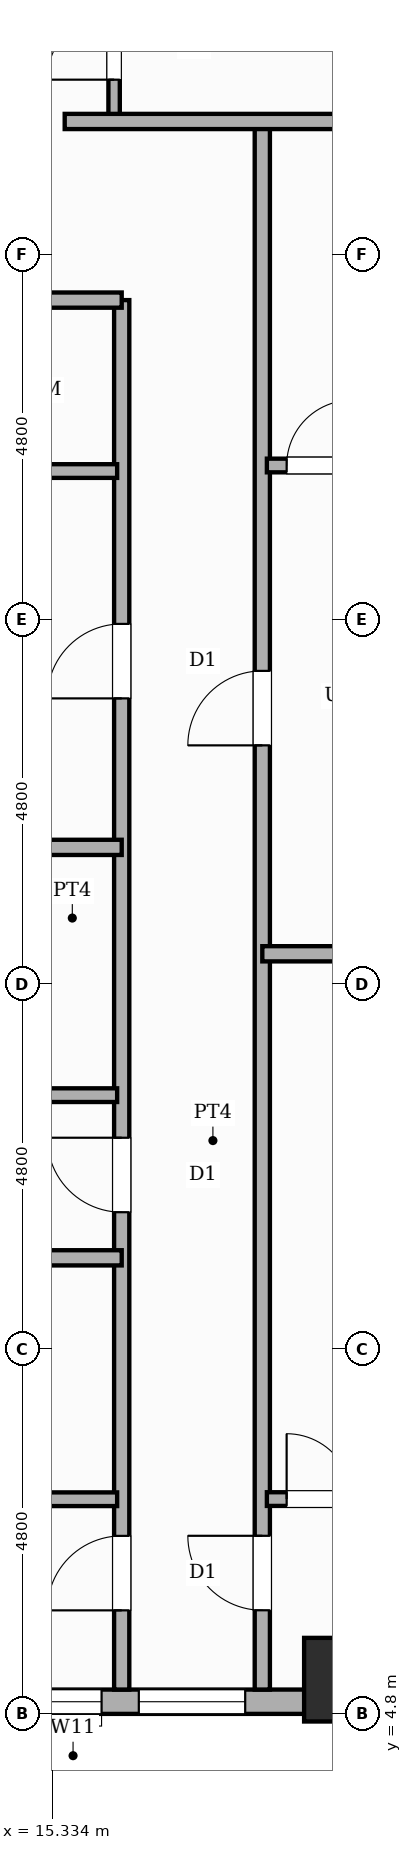
"""IFC4 building model, lengths in metres.
Left out: names, types, materials, properties, quantities, classifications, styles, units other than length and angle.
Written with IfcOpenShell. Run it as: python <this file> out.ifc"""

import sys

from ifc_helpers import new_model, si_unit, direction, frame, frame_2d, origin, origin_2d, place, context, subcontext, project, spatial, rectangle, extrude, element, fill, save


model = new_model("IFC4")
c1 = context("Model", 3, precision=1e-05, world=origin(), true_north=direction((0.0, 1.0)))
c2 = subcontext(c1, "Body", "Model", "MODEL_VIEW")
j1 = project(units=[si_unit("LENGTHUNIT", "METRE"), si_unit("PLANEANGLEUNIT", "RADIAN")], contexts=[c1])
p1 = place(None, origin())
s1 = spatial("IfcSite", under=j1, at=p1, CompositionType="ELEMENT")
p2 = place(p1, origin())
s2 = spatial("IfcBuilding", under=s1, at=p2, CompositionType="ELEMENT")
p3 = place(p2, frame((0.0, 0.0, 46.6)))
s3 = spatial("IfcBuildingStorey", under=s2, at=p3, CompositionType="ELEMENT", Elevation=46.6)
p4 = place(p3, frame((19.2, 5.25, 0.0), z_axis=(0.0, 0.0, 1.0), x_axis=(1.0, 0.0, 0.0)))
e1 = element("IfcColumn", 1, at=p4, inside=s3, PredefinedType="COLUMN", context=c2, shape_type="SweptSolid", body=[
    extrude(rectangle(XDim=1.1, YDim=1.1, at=origin_2d()), origin(), (0.0, 0.0, 1.0), 3.6),
])
p5 = place(p3, frame((21.6, 4.96, 0.0), z_axis=(0.0, 0.0, 1.0), x_axis=(-1.0, 0.0, 0.0)))
e2 = element("IfcWall", 2, at=p5, inside=s3, PredefinedType="STANDARD", context=c2, shape_type="SweptSolid", body=[
    extrude(rectangle(XDim=14.4, YDim=0.32, at=frame_2d((7.2, 0.0))), origin(), (0.0, 0.0, 1.0), 2.53),
])
p6 = place(p5, frame((5.615, 0.0, 0.45)))
e3 = element("IfcOpeningElement", 3, at=p6, cuts=e2, PredefinedType="OPENING", context=c2, shape_type="SweptSolid", body=[
    extrude(rectangle(XDim=0.75, YDim=1.8, at=frame_2d((0.375, 0.9))), frame((0.0, 0.17, 0.0), z_axis=(0.0, -1.0, 0.0), x_axis=(1.0, 0.0, 0.0)), (0.0, 0.0, 1.0), 0.34),
])
p7 = place(p5, frame((3.725, 0.0, 0.65)))
e4 = element("IfcOpeningElement", 4, at=p7, cuts=e2, PredefinedType="OPENING", context=c2, shape_type="SweptSolid", body=[
    extrude(rectangle(XDim=1.4, YDim=1.1, at=frame_2d((0.7, 0.55))), frame((0.0, 0.17, 0.0), z_axis=(0.0, -1.0, 0.0), x_axis=(1.0, 0.0, 0.0)), (0.0, 0.0, 1.0), 0.34),
])
p8 = place(p5, frame((0.47, 0.0, 0.45)))
e5 = element("IfcOpeningElement", 5, at=p8, cuts=e2, PredefinedType="OPENING", context=c2, shape_type="SweptSolid", body=[
    extrude(rectangle(XDim=0.95, YDim=1.8, at=frame_2d((0.475, 0.9))), frame((0.0, 0.17, 0.0), z_axis=(0.0, -1.0, 0.0), x_axis=(1.0, 0.0, 0.0)), (0.0, 0.0, 1.0), 0.34),
])
p9 = place(p3, frame((16.15, 25.75, 0.0), z_axis=(0.0, 0.0, 1.0), x_axis=(0.0, 1.0, 0.0)))
e6 = element("IfcWall", 6, at=p9, inside=s3, PredefinedType="PARTITIONING", context=c2, shape_type="SweptSolid", body=[
    extrude(rectangle(XDim=2.25, YDim=0.15, at=frame_2d((1.125, 0.0))), origin(), (0.0, 0.0, 1.0), 3.35),
])
p10 = place(p9, frame((0.55, 0.0, 0.0)))
e7 = element("IfcOpeningElement", 7, at=p10, cuts=e6, PredefinedType="OPENING", context=c2, shape_type="SweptSolid", body=[
    extrude(rectangle(XDim=0.88, YDim=2.1, at=frame_2d((0.44, 1.05))), frame((0.0, 0.085, 0.0), z_axis=(0.0, -1.0, 0.0), x_axis=(1.0, 0.0, 0.0)), (0.0, 0.0, 1.0), 0.17),
])
p11 = place(p3, frame((16.25, 5.12, 0.0), z_axis=(0.0, 0.0, 1.0), x_axis=(0.0, 1.0, 0.0)))
e8 = element("IfcWall", 8, at=p11, inside=s3, PredefinedType="PARTITIONING", context=c2, shape_type="SweptSolid", body=[
    extrude(rectangle(XDim=18.28, YDim=0.2, at=frame_2d((9.14, 0.0))), origin(), (0.0, 0.0, 1.0), 3.35),
])
p12 = place(p11, frame((1.042, 0.0, 0.0)))
e9 = element("IfcOpeningElement", 9, at=p12, cuts=e8, PredefinedType="OPENING", context=c2, shape_type="SweptSolid", body=[
    extrude(rectangle(XDim=0.98, YDim=2.18, at=frame_2d((0.49, 1.09))), frame((0.0, 0.11, 0.0), z_axis=(0.0, -1.0, 0.0), x_axis=(1.0, 0.0, 0.0)), (0.0, 0.0, 1.0), 0.22),
])
p13 = place(p11, frame((6.28, 0.0, 0.0)))
e10 = element("IfcOpeningElement", 10, at=p13, cuts=e8, PredefinedType="OPENING", context=c2, shape_type="SweptSolid", body=[
    extrude(rectangle(XDim=0.98, YDim=2.18, at=frame_2d((0.49, 1.09))), frame((0.0, 0.11, 0.0), z_axis=(0.0, -1.0, 0.0), x_axis=(1.0, 0.0, 0.0)), (0.0, 0.0, 1.0), 0.22),
])
p14 = place(p11, frame((13.04, 0.0, 0.0)))
e11 = element("IfcOpeningElement", 11, at=p14, cuts=e8, PredefinedType="OPENING", context=c2, shape_type="SweptSolid", body=[
    extrude(rectangle(XDim=0.98, YDim=2.18, at=frame_2d((0.49, 1.09))), frame((0.0, 0.11, 0.0), z_axis=(0.0, -1.0, 0.0), x_axis=(1.0, 0.0, 0.0)), (0.0, 0.0, 1.0), 0.22),
])
p15 = place(p3, frame((18.1, 5.12, 0.0), z_axis=(0.0, 0.0, 1.0), x_axis=(0.0, 1.0, 0.0)))
e12 = element("IfcWall", 12, at=p15, inside=s3, PredefinedType="PARTITIONING", context=c2, shape_type="SweptSolid", body=[
    extrude(rectangle(XDim=20.63, YDim=0.2, at=frame_2d((10.315, 0.0))), origin(), (0.0, 0.0, 1.0), 3.35),
])
p16 = place(p15, frame((1.043, 0.0, 0.0)))
e13 = element("IfcOpeningElement", 13, at=p16, cuts=e12, PredefinedType="OPENING", context=c2, shape_type="SweptSolid", body=[
    extrude(rectangle(XDim=0.98, YDim=2.18, at=frame_2d((0.49, 1.09))), frame((0.0, 0.11, 0.0), z_axis=(0.0, -1.0, 0.0), x_axis=(1.0, 0.0, 0.0)), (0.0, 0.0, 1.0), 0.22),
])
p17 = place(p15, frame((12.422, 0.0, 0.0)))
e14 = element("IfcOpeningElement", 14, at=p17, cuts=e12, PredefinedType="OPENING", context=c2, shape_type="SweptSolid", body=[
    extrude(rectangle(XDim=0.98, YDim=2.18, at=frame_2d((0.49, 1.09))), frame((0.0, 0.11, 0.0), z_axis=(0.0, -1.0, 0.0), x_axis=(1.0, 0.0, 0.0)), (0.0, 0.0, 1.0), 0.22),
])
p18 = place(p3, frame((5.12, 23.4, 0.0), z_axis=(0.0, 0.0, 1.0), x_axis=(1.0, 0.0, 0.0)))
e15 = element("IfcWall", 15, at=p18, inside=s3, PredefinedType="PARTITIONING", context=c2, shape_type="SweptSolid", body=[
    extrude(rectangle(XDim=11.13, YDim=0.2, at=frame_2d((5.565, 0.0))), origin(), (0.0, 0.0, 1.0), 3.35),
])
p19 = place(p3, frame((15.5, 25.75, 0.0), z_axis=(0.0, 0.0, 1.0), x_axis=(1.0, 0.0, 0.0)))
e16 = element("IfcWall", 16, at=p19, inside=s3, PredefinedType="PARTITIONING", context=c2, shape_type="SweptSolid", body=[
    extrude(rectangle(XDim=8.18, YDim=0.2, at=frame_2d((4.09, 0.0))), origin(), (0.0, 0.0, 1.0), 3.35),
])
p20 = place(p3, frame((5.12, 7.624, 0.0), z_axis=(0.0, 0.0, 1.0), x_axis=(1.0, 0.0, 0.0)))
e17 = element("IfcWall", 17, at=p20, inside=s3, PredefinedType="PLUMBINGWALL", context=c2, shape_type="SweptSolid", body=[
    extrude(rectangle(XDim=11.07, YDim=0.18, at=frame_2d((5.535, 0.0))), origin(), (0.0, 0.0, 1.0), 3.35),
])
p21 = place(p20, frame((2.209, 0.0, 0.0)))
e18 = element("IfcOpeningElement", 18, at=p21, cuts=e17, PredefinedType="OPENING", context=c2, shape_type="SweptSolid", body=[
    extrude(rectangle(XDim=0.86, YDim=2.1, at=frame_2d((0.43, 1.05))), frame((0.0, 0.1, 0.0), z_axis=(0.0, -1.0, 0.0), x_axis=(1.0, 0.0, 0.0)), (0.0, 0.0, 1.0), 0.2),
])
p22 = place(p20, frame((7.824, 0.0, 0.0)))
e19 = element("IfcOpeningElement", 19, at=p22, cuts=e17, PredefinedType="OPENING", context=c2, shape_type="SweptSolid", body=[
    extrude(rectangle(XDim=0.86, YDim=2.1, at=frame_2d((0.43, 1.05))), frame((0.0, 0.1, 0.0), z_axis=(0.0, -1.0, 0.0), x_axis=(1.0, 0.0, 0.0)), (0.0, 0.0, 1.0), 0.2),
])
p23 = place(p3, frame((5.12, 10.8, 0.0), z_axis=(0.0, 0.0, 1.0), x_axis=(1.0, 0.0, 0.0)))
e20 = element("IfcWall", 20, at=p23, inside=s3, PredefinedType="SOLIDWALL", context=c2, shape_type="SweptSolid", body=[
    extrude(rectangle(XDim=11.13, YDim=0.2, at=frame_2d((5.565, 0.0))), origin(), (0.0, 0.0, 1.0), 3.35),
])
p24 = place(p3, frame((5.12, 12.94, 0.0), z_axis=(0.0, 0.0, 1.0), x_axis=(1.0, 0.0, 0.0)))
e21 = element("IfcWall", 21, at=p24, inside=s3, PredefinedType="PLUMBINGWALL", context=c2, shape_type="SweptSolid", body=[
    extrude(rectangle(XDim=11.07, YDim=0.18, at=frame_2d((5.535, 0.0))), origin(), (0.0, 0.0, 1.0), 3.35),
])
p25 = place(p24, frame((2.209, 0.0, 0.0)))
e22 = element("IfcOpeningElement", 22, at=p25, cuts=e21, PredefinedType="OPENING", context=c2, shape_type="SweptSolid", body=[
    extrude(rectangle(XDim=0.86, YDim=2.1, at=frame_2d((0.43, 1.05))), frame((0.0, 0.1, 0.0), z_axis=(0.0, -1.0, 0.0), x_axis=(1.0, 0.0, 0.0)), (0.0, 0.0, 1.0), 0.2),
])
p26 = place(p24, frame((7.824, 0.0, 0.0)))
e23 = element("IfcOpeningElement", 23, at=p26, cuts=e21, PredefinedType="OPENING", context=c2, shape_type="SweptSolid", body=[
    extrude(rectangle(XDim=0.86, YDim=2.1, at=frame_2d((0.43, 1.05))), frame((0.0, 0.1, 0.0), z_axis=(0.0, -1.0, 0.0), x_axis=(1.0, 0.0, 0.0)), (0.0, 0.0, 1.0), 0.2),
])
p27 = place(p3, frame((5.12, 16.2, 0.0), z_axis=(0.0, 0.0, 1.0), x_axis=(1.0, 0.0, 0.0)))
e24 = element("IfcWall", 24, at=p27, inside=s3, PredefinedType="SOLIDWALL", context=c2, shape_type="SweptSolid", body=[
    extrude(rectangle(XDim=11.13, YDim=0.2, at=frame_2d((5.565, 0.0))), origin(), (0.0, 0.0, 1.0), 3.35),
])
p28 = place(p3, frame((5.12, 21.151, 0.0), z_axis=(0.0, 0.0, 1.0), x_axis=(1.0, 0.0, 0.0)))
e25 = element("IfcWall", 25, at=p28, inside=s3, PredefinedType="PLUMBINGWALL", context=c2, shape_type="SweptSolid", body=[
    extrude(rectangle(XDim=11.07, YDim=0.18, at=frame_2d((5.535, 0.0))), origin(), (0.0, 0.0, 1.0), 3.35),
])
p29 = place(p28, frame((2.431, 0.0, 0.0)))
e26 = element("IfcOpeningElement", 26, at=p29, cuts=e25, PredefinedType="OPENING", context=c2, shape_type="SweptSolid", body=[
    extrude(rectangle(XDim=0.9, YDim=2.15, at=frame_2d((0.45, 1.075))), frame((0.0, 0.1, 0.0), z_axis=(0.0, -1.0, 0.0), x_axis=(1.0, 0.0, 0.0)), (0.0, 0.0, 1.0), 0.2),
])
p30 = place(p28, frame((8.046, 0.0, 0.0)))
e27 = element("IfcOpeningElement", 27, at=p30, cuts=e25, PredefinedType="OPENING", context=c2, shape_type="SweptSolid", body=[
    extrude(rectangle(XDim=0.86, YDim=2.1, at=frame_2d((0.43, 1.05))), frame((0.0, 0.1, 0.0), z_axis=(0.0, -1.0, 0.0), x_axis=(1.0, 0.0, 0.0)), (0.0, 0.0, 1.0), 0.2),
])
p31 = place(p3, frame((18.16, 7.626, 0.0), z_axis=(0.0, 0.0, 1.0), x_axis=(1.0, 0.0, 0.0)))
e28 = element("IfcWall", 28, at=p31, inside=s3, PredefinedType="PLUMBINGWALL", context=c2, shape_type="SweptSolid", body=[
    extrude(rectangle(XDim=5.52, YDim=0.18, at=frame_2d((2.76, 0.0))), origin(), (0.0, 0.0, 1.0), 3.35),
])
p32 = place(p31, frame((0.26, 0.0, 0.0)))
e29 = element("IfcOpeningElement", 29, at=p32, cuts=e28, PredefinedType="OPENING", context=c2, shape_type="SweptSolid", body=[
    extrude(rectangle(XDim=0.86, YDim=2.1, at=frame_2d((0.43, 1.05))), frame((0.0, 0.1, 0.0), z_axis=(0.0, -1.0, 0.0), x_axis=(1.0, 0.0, 0.0)), (0.0, 0.0, 1.0), 0.2),
])
p33 = place(p31, frame((1.698, 0.0, 0.0)))
e30 = element("IfcOpeningElement", 30, at=p33, cuts=e28, PredefinedType="OPENING", context=c2, shape_type="SweptSolid", body=[
    extrude(rectangle(XDim=0.9, YDim=2.15, at=frame_2d((0.45, 1.075))), frame((0.0, 0.1, 0.0), z_axis=(0.0, -1.0, 0.0), x_axis=(1.0, 0.0, 0.0)), (0.0, 0.0, 1.0), 0.2),
])
p34 = place(p31, frame((3.757, 0.0, 0.0)))
e31 = element("IfcOpeningElement", 31, at=p34, cuts=e28, PredefinedType="OPENING", context=c2, shape_type="SweptSolid", body=[
    extrude(rectangle(XDim=0.9, YDim=2.15, at=frame_2d((0.45, 1.075))), frame((0.0, 0.1, 0.0), z_axis=(0.0, -1.0, 0.0), x_axis=(1.0, 0.0, 0.0)), (0.0, 0.0, 1.0), 0.2),
])
p35 = place(p3, frame((18.1, 14.8, 0.0), z_axis=(0.0, 0.0, 1.0), x_axis=(1.0, 0.0, 0.0)))
e32 = element("IfcWall", 32, at=p35, inside=s3, PredefinedType="SOLIDWALL", context=c2, shape_type="SweptSolid", body=[
    extrude(rectangle(XDim=5.58, YDim=0.2, at=frame_2d((2.79, 0.0))), origin(), (0.0, 0.0, 1.0), 3.35),
])
p36 = place(p3, frame((18.16, 21.224, 0.0), z_axis=(0.0, 0.0, 1.0), x_axis=(1.0, 0.0, 0.0)))
e33 = element("IfcWall", 33, at=p36, inside=s3, PredefinedType="PLUMBINGWALL", context=c2, shape_type="SweptSolid", body=[
    extrude(rectangle(XDim=5.52, YDim=0.18, at=frame_2d((2.76, 0.0))), origin(), (0.0, 0.0, 1.0), 3.35),
])
p37 = place(p36, frame((0.26, 0.0, 0.0)))
e34 = element("IfcOpeningElement", 34, at=p37, cuts=e33, PredefinedType="OPENING", context=c2, shape_type="SweptSolid", body=[
    extrude(rectangle(XDim=0.86, YDim=2.1, at=frame_2d((0.43, 1.05))), frame((0.0, 0.1, 0.0), z_axis=(0.0, -1.0, 0.0), x_axis=(1.0, 0.0, 0.0)), (0.0, 0.0, 1.0), 0.2),
])
p38 = place(p36, frame((1.698, 0.0, 0.0)))
e35 = element("IfcOpeningElement", 35, at=p38, cuts=e33, PredefinedType="OPENING", context=c2, shape_type="SweptSolid", body=[
    extrude(rectangle(XDim=0.9, YDim=2.15, at=frame_2d((0.45, 1.075))), frame((0.0, 0.1, 0.0), z_axis=(0.0, -1.0, 0.0), x_axis=(1.0, 0.0, 0.0)), (0.0, 0.0, 1.0), 0.2),
])
p39 = place(p36, frame((3.757, 0.0, 0.0)))
e36 = element("IfcOpeningElement", 36, at=p39, cuts=e33, PredefinedType="OPENING", context=c2, shape_type="SweptSolid", body=[
    extrude(rectangle(XDim=0.9, YDim=2.15, at=frame_2d((0.45, 1.075))), frame((0.0, 0.1, 0.0), z_axis=(0.0, -1.0, 0.0), x_axis=(1.0, 0.0, 0.0)), (0.0, 0.0, 1.0), 0.2),
])
p40 = place(p6, origin())
e37 = element("IfcWindow", 37, at=p40, inside=s3, PartitioningType="SINGLE_PANEL", PredefinedType="WINDOW", context=c2, shape_type="SweptSolid", body=[
    extrude(rectangle(XDim=0.75, YDim=1.8, at=frame_2d((0.375, 0.9))), frame((0.0, 0.03, 0.0), z_axis=(0.0, -1.0, 0.0), x_axis=(1.0, 0.0, 0.0)), (0.0, 0.0, 1.0), 0.06),
])
fill(e3, e37)
p41 = place(p7, origin())
e38 = element("IfcWindow", 38, at=p41, inside=s3, PartitioningType="SINGLE_PANEL", PredefinedType="WINDOW", context=c2, shape_type="SweptSolid", body=[
    extrude(rectangle(XDim=1.4, YDim=1.1, at=frame_2d((0.7, 0.55))), frame((0.0, 0.03, 0.0), z_axis=(0.0, -1.0, 0.0), x_axis=(1.0, 0.0, 0.0)), (0.0, 0.0, 1.0), 0.06),
])
fill(e4, e38)
p42 = place(p10, origin())
e39 = element("IfcDoor", 39, at=p42, inside=s3, OperationType="SINGLE_SWING_LEFT", PredefinedType="DOOR", context=c2, shape_type="SweptSolid", body=[
    extrude(rectangle(XDim=0.88, YDim=2.1, at=frame_2d((0.44, 1.05))), frame((0.0, 0.025, 0.0), z_axis=(0.0, -1.0, 0.0), x_axis=(1.0, 0.0, 0.0)), (0.0, 0.0, 1.0), 0.05),
])
fill(e7, e39)
p43 = place(p12, origin())
e40 = element("IfcDoor", 40, at=p43, inside=s3, OperationType="SINGLE_SWING_LEFT", PredefinedType="DOOR", context=c2, shape_type="SweptSolid", body=[
    extrude(rectangle(XDim=0.98, YDim=2.18, at=frame_2d((0.49, 1.09))), frame((0.0, 0.025, 0.0), z_axis=(0.0, -1.0, 0.0), x_axis=(1.0, 0.0, 0.0)), (0.0, 0.0, 1.0), 0.05),
])
fill(e9, e40)
p44 = place(p13, origin())
e41 = element("IfcDoor", 41, at=p44, inside=s3, OperationType="SINGLE_SWING_RIGHT", PredefinedType="DOOR", context=c2, shape_type="SweptSolid", body=[
    extrude(rectangle(XDim=0.98, YDim=2.18, at=frame_2d((0.49, 1.09))), frame((0.0, 0.025, 0.0), z_axis=(0.0, -1.0, 0.0), x_axis=(1.0, 0.0, 0.0)), (0.0, 0.0, 1.0), 0.05),
])
fill(e10, e41)
p45 = place(p14, origin())
e42 = element("IfcDoor", 42, at=p45, inside=s3, OperationType="SINGLE_SWING_LEFT", PredefinedType="DOOR", context=c2, shape_type="SweptSolid", body=[
    extrude(rectangle(XDim=0.98, YDim=2.18, at=frame_2d((0.49, 1.09))), frame((0.0, 0.025, 0.0), z_axis=(0.0, -1.0, 0.0), x_axis=(1.0, 0.0, 0.0)), (0.0, 0.0, 1.0), 0.05),
])
fill(e11, e42)
p46 = place(p16, origin())
e43 = element("IfcDoor", 43, at=p46, inside=s3, OperationType="SINGLE_SWING_RIGHT", PredefinedType="DOOR", context=c2, shape_type="SweptSolid", body=[
    extrude(rectangle(XDim=0.98, YDim=2.18, at=frame_2d((0.49, 1.09))), frame((0.0, 0.025, 0.0), z_axis=(0.0, -1.0, 0.0), x_axis=(1.0, 0.0, 0.0)), (0.0, 0.0, 1.0), 0.05),
])
fill(e13, e43)
p47 = place(p32, origin())
e44 = element("IfcDoor", 44, at=p47, inside=s3, OperationType="SINGLE_SWING_LEFT", PredefinedType="DOOR", context=c2, shape_type="SweptSolid", body=[
    extrude(rectangle(XDim=0.86, YDim=2.1, at=frame_2d((0.43, 1.05))), frame((0.0, 0.025, 0.0), z_axis=(0.0, -1.0, 0.0), x_axis=(1.0, 0.0, 0.0)), (0.0, 0.0, 1.0), 0.05),
])
fill(e29, e44)
p48 = place(p17, origin())
e45 = element("IfcDoor", 45, at=p48, inside=s3, OperationType="SINGLE_SWING_LEFT", PredefinedType="DOOR", context=c2, shape_type="SweptSolid", body=[
    extrude(rectangle(XDim=0.98, YDim=2.18, at=frame_2d((0.49, 1.09))), frame((0.0, 0.025, 0.0), z_axis=(0.0, -1.0, 0.0), x_axis=(1.0, 0.0, 0.0)), (0.0, 0.0, 1.0), 0.05),
])
fill(e14, e45)
p49 = place(p37, origin())
e46 = element("IfcDoor", 46, at=p49, inside=s3, OperationType="SINGLE_SWING_RIGHT", PredefinedType="DOOR", context=c2, shape_type="SweptSolid", body=[
    extrude(rectangle(XDim=0.86, YDim=2.1, at=frame_2d((0.43, 1.05))), frame((0.0, 0.025, 0.0), z_axis=(0.0, -1.0, 0.0), x_axis=(1.0, 0.0, 0.0)), (0.0, 0.0, 1.0), 0.05),
])
fill(e34, e46)
save(model, sys.argv[1])
